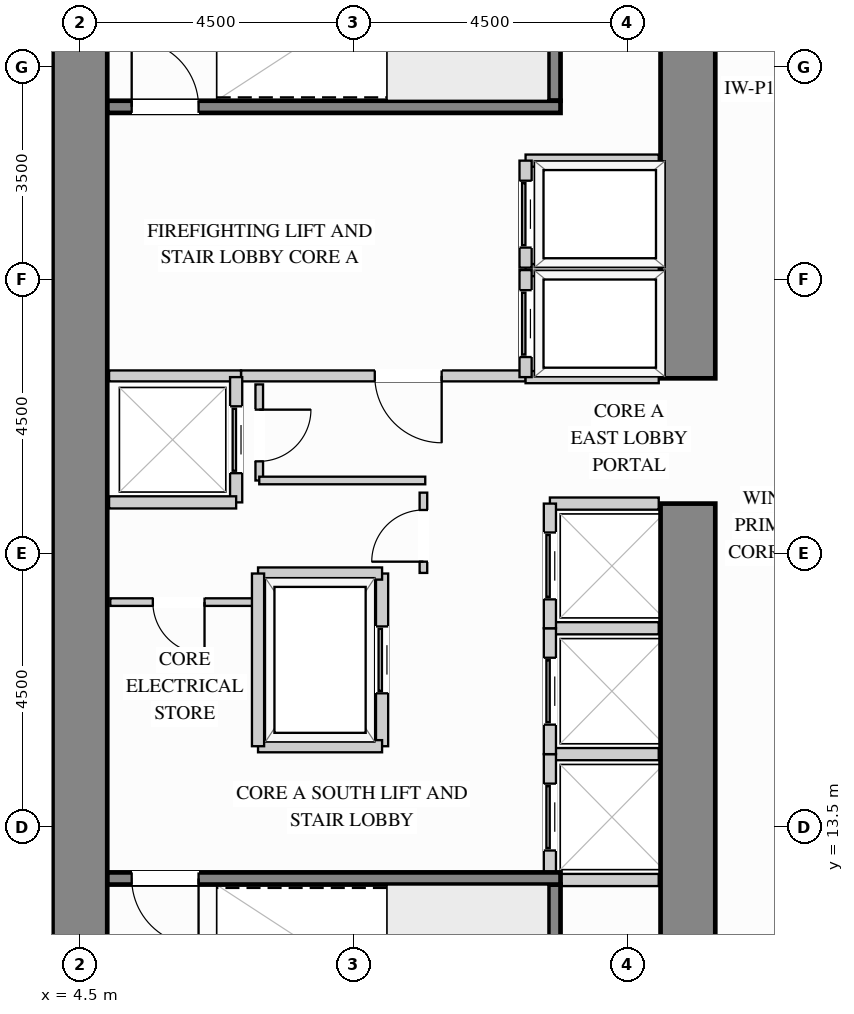
"""IFC4 building model, lengths in metres.
Left out: names, types, materials, properties, quantities, classifications, styles, units other than length and angle.
Written with IfcOpenShell. Run it as: python <this file> out.ifc"""

import sys

from ifc_helpers import new_model, si_unit, direction, frame, frame_2d, origin, place, context, subcontext, project, spatial, rectangle, extrude, source, transform, mapped, element, fill, save


model = new_model("IFC4")
c1 = context("Model", 3, precision=1e-05, world=origin(), true_north=direction((0.0, 1.0)))
c2 = subcontext(c1, "Body", "Model", "MODEL_VIEW")
j1 = project(units=[si_unit("LENGTHUNIT", "METRE"), si_unit("PLANEANGLEUNIT", "RADIAN")], contexts=[c1])
p1 = place(None, origin())
s1 = spatial("IfcSite", under=j1, at=p1, CompositionType="ELEMENT")
p2 = place(p1, origin())
s2 = spatial("IfcBuilding", under=s1, at=p2, CompositionType="ELEMENT")
p3 = place(p2, frame((0.0, 0.0, 33.3)))
s3 = spatial("IfcBuildingStorey", under=s2, at=p3, CompositionType="ELEMENT", Elevation=33.3)
m1 = source(origin(), c2, "Body", "SweptSolid", [
    extrude(rectangle(XDim=9.87, YDim=0.9, at=frame_2d((4.935, 0.0))), origin(), (0.0, 0.0, 1.0), 3.38),
])
p4 = place(p3, frame((14.5, 8.95, 0.0), z_axis=(0.0, 0.0, 1.0), x_axis=(0.0, 1.0, 0.0)))
e1 = element("IfcWall", 1, at=p4, inside=s3, PredefinedType="SHEAR", context=c2, shape_type="MappedRepresentation", body=[
    mapped(m1, transform((0.0, 0.0, 0.0), x_axis=(1.0, 0.0, 0.0), y_axis=(0.0, 1.0, 0.0), z_axis=(0.0, 0.0, 1.0))),
])
m2 = source(origin(), c2, "Body", "SweptSolid", [
    extrude(rectangle(XDim=8.17, YDim=0.9, at=frame_2d((4.085, 0.0))), origin(), (0.0, 0.0, 1.0), 3.38),
])
p5 = place(p3, frame((14.5, 20.88, 0.0), z_axis=(0.0, 0.0, 1.0), x_axis=(0.0, 1.0, 0.0)))
e2 = element("IfcWall", 2, at=p5, inside=s3, PredefinedType="SHEAR", context=c2, shape_type="MappedRepresentation", body=[
    mapped(m2, transform((0.0, 0.0, 0.0), x_axis=(1.0, 0.0, 0.0), y_axis=(0.0, 1.0, 0.0), z_axis=(0.0, 0.0, 1.0))),
])
m3 = source(origin(), c2, "Body", "SweptSolid", [
    extrude(rectangle(XDim=20.1, YDim=0.9, at=frame_2d((10.05, 0.0))), origin(), (0.0, 0.0, 1.0), 3.38),
])
p6 = place(p3, frame((4.5, 8.95, 0.0), z_axis=(0.0, 0.0, 1.0), x_axis=(0.0, 1.0, 0.0)))
e3 = element("IfcWall", 3, at=p6, inside=s3, PredefinedType="SHEAR", context=c2, shape_type="MappedRepresentation", body=[
    mapped(m3, transform((0.0, 0.0, 0.0), x_axis=(1.0, 0.0, 0.0), y_axis=(0.0, 1.0, 0.0), z_axis=(0.0, 0.0, 1.0))),
])
p7 = place(p3, frame((7.15, 20.92, 0.0), z_axis=(0.0, 0.0, 1.0), x_axis=(1.0, 0.0, 0.0)))
e4 = element("IfcWall", 4, at=p7, inside=s3, PredefinedType="PARTITIONING", context=c2, shape_type="SweptSolid", body=[
    extrude(rectangle(XDim=4.68, YDim=0.18, at=frame_2d((2.34, 0.0))), origin(), (0.0, 0.0, 1.0), 3.365),
])
p8 = place(p7, frame((2.2, 0.0, 0.0)))
e5 = element("IfcOpeningElement", 5, at=p8, cuts=e4, PredefinedType="OPENING", context=c2, shape_type="SweptSolid", body=[
    extrude(rectangle(XDim=1.1, YDim=2.15, at=frame_2d((0.55, 1.075))), frame((0.0, 0.1, 0.0), z_axis=(0.0, -1.0, 0.0), x_axis=(1.0, 0.0, 0.0)), (0.0, 0.0, 1.0), 0.2),
])
m4 = source(origin(), c2, "Body", "SweptSolid", [
    extrude(rectangle(XDim=2.17, YDim=0.18, at=frame_2d((1.085, 0.0))), origin(), (0.0, 0.0, 1.0), 3.365),
])
p9 = place(p3, frame((4.98, 20.92, 0.0), z_axis=(0.0, 0.0, 1.0), x_axis=(1.0, 0.0, 0.0)))
e6 = element("IfcWall", 6, at=p9, inside=s3, PredefinedType="PARTITIONING", context=c2, shape_type="MappedRepresentation", body=[
    mapped(m4, transform((0.0, 0.0, 0.0), x_axis=(1.0, 0.0, 0.0), y_axis=(0.0, 1.0, 0.0), z_axis=(0.0, 0.0, 1.0))),
])
p10 = place(p3, frame((10.15, 17.68, 0.0), z_axis=(0.0, 0.0, 1.0), x_axis=(0.0, 1.0, 0.0)))
e7 = element("IfcWall", 7, at=p10, inside=s3, PredefinedType="PARTITIONING", context=c2, shape_type="SweptSolid", body=[
    extrude(rectangle(XDim=1.32, YDim=0.125, at=frame_2d((0.66, 0.0))), origin(), (0.0, 0.0, 1.0), 3.365),
])
p11 = place(p10, frame((0.185, 0.0, 0.0)))
e8 = element("IfcOpeningElement", 8, at=p11, cuts=e7, PredefinedType="OPENING", context=c2, shape_type="SweptSolid", body=[
    extrude(rectangle(XDim=0.85, YDim=2.1, at=frame_2d((0.425, 1.05))), frame((0.0, 0.073, 0.0), z_axis=(0.0, -1.0, 0.0), x_axis=(1.0, 0.0, 0.0)), (0.0, 0.0, 1.0), 0.145),
])
p12 = place(p3, frame((7.45, 19.2, 0.0), z_axis=(0.0, 0.0, 1.0), x_axis=(0.0, 1.0, 0.0)))
e9 = element("IfcWall", 9, at=p12, inside=s3, PredefinedType="PARTITIONING", context=c2, shape_type="SweptSolid", body=[
    extrude(rectangle(XDim=1.58, YDim=0.125, at=frame_2d((0.79, 0.0))), origin(), (0.0, 0.0, 1.0), 3.365),
])
p13 = place(p12, frame((0.315, 0.0, 0.0)))
e10 = element("IfcOpeningElement", 10, at=p13, cuts=e9, PredefinedType="OPENING", context=c2, shape_type="SweptSolid", body=[
    extrude(rectangle(XDim=0.85, YDim=2.1, at=frame_2d((0.425, 1.05))), frame((0.0, 0.073, 0.0), z_axis=(0.0, -1.0, 0.0), x_axis=(1.0, 0.0, 0.0)), (0.0, 0.0, 1.0), 0.145),
])
m5 = source(origin(), c2, "Body", "SweptSolid", [
    extrude(rectangle(XDim=2.73, YDim=0.125, at=frame_2d((1.365, 0.0))), origin(), (0.0, 0.0, 1.0), 3.365),
])
p14 = place(p3, frame((7.45, 19.2, 0.0), z_axis=(0.0, 0.0, 1.0), x_axis=(1.0, 0.0, 0.0)))
e11 = element("IfcWall", 11, at=p14, inside=s3, PredefinedType="PARTITIONING", context=c2, shape_type="MappedRepresentation", body=[
    mapped(m5, transform((0.0, 0.0, 0.0), x_axis=(1.0, 0.0, 0.0), y_axis=(0.0, 1.0, 0.0), z_axis=(0.0, 0.0, 1.0))),
])
p15 = place(p3, frame((5.0, 17.2, 0.0), z_axis=(0.0, 0.0, 1.0), x_axis=(1.0, 0.0, 0.0)))
e12 = element("IfcWall", 12, at=p15, inside=s3, PredefinedType="PARTITIONING", context=c2, shape_type="SweptSolid", body=[
    extrude(rectangle(XDim=2.4, YDim=0.125, at=frame_2d((1.2, 0.0))), origin(), (0.0, 0.0, 1.0), 3.365),
])
p16 = place(p15, frame((0.7, 0.0, 0.0)))
e13 = element("IfcOpeningElement", 13, at=p16, cuts=e12, PredefinedType="OPENING", context=c2, shape_type="SweptSolid", body=[
    extrude(rectangle(XDim=0.85, YDim=2.1, at=frame_2d((0.425, 1.05))), frame((0.0, 0.073, 0.0), z_axis=(0.0, -1.0, 0.0), x_axis=(1.0, 0.0, 0.0)), (0.0, 0.0, 1.0), 0.145),
])
m6 = source(origin(), c2, "Body", "SweptSolid", [
    extrude(rectangle(XDim=2.19, YDim=0.2, at=frame_2d((1.095, 0.0))), origin(), (0.0, 0.0, 1.0), 3.365),
])
for number, where, z_axis, x_axis in (
    (14, (11.83, 22.66, 0.0), (0.0, 0.0, 1.0), (1.0, 0.0, 0.0)),
    (15, (11.83, 20.9, 0.0), (0.0, 0.0, 1.0), (1.0, 0.0, 0.0)),
):
    element("IfcWall", number, at=place(p3, frame(where, z_axis=z_axis, x_axis=x_axis)), inside=s3, PredefinedType="PARTITIONING", context=c2, shape_type="MappedRepresentation", body=[
        mapped(m6, transform((0.0, 0.0, 0.0), x_axis=(1.0, 0.0, 0.0), y_axis=(0.0, 1.0, 0.0), z_axis=(0.0, 0.0, 1.0))),
    ])
p17 = place(p3, frame((11.83, 20.9, 0.0), z_axis=(0.0, 0.0, 1.0), x_axis=(0.0, 1.0, 0.0)))
e16 = element("IfcWall", 16, at=p17, inside=s3, PredefinedType="PARTITIONING", context=c2, shape_type="SweptSolid", body=[
    extrude(rectangle(XDim=1.76, YDim=0.2, at=frame_2d((0.88, 0.0))), origin(), (0.0, 0.0, 1.0), 3.365),
])
p18 = place(p17, frame((0.33, 0.0, 0.0)))
e17 = element("IfcOpeningElement", 17, at=p18, cuts=e16, PredefinedType="OPENING", context=c2, shape_type="SweptSolid", body=[
    extrude(rectangle(XDim=1.1, YDim=2.2, at=frame_2d((0.55, 1.1))), frame((0.0, 0.11, 0.0), z_axis=(0.0, -1.0, 0.0), x_axis=(1.0, 0.0, 0.0)), (0.0, 0.0, 1.0), 0.22),
])
p19 = place(p3, frame((11.83, 24.46, 0.0), z_axis=(0.0, 0.0, 1.0), x_axis=(1.0, 0.0, 0.0)))
e18 = element("IfcWall", 18, at=p19, inside=s3, PredefinedType="PARTITIONING", context=c2, shape_type="MappedRepresentation", body=[
    mapped(m6, transform((0.0, 0.0, 0.0), x_axis=(1.0, 0.0, 0.0), y_axis=(0.0, 1.0, 0.0), z_axis=(0.0, 0.0, 1.0))),
])
p20 = place(p3, frame((11.83, 22.7, 0.0), z_axis=(0.0, 0.0, 1.0), x_axis=(0.0, 1.0, 0.0)))
e19 = element("IfcWall", 19, at=p20, inside=s3, PredefinedType="PARTITIONING", context=c2, shape_type="SweptSolid", body=[
    extrude(rectangle(XDim=1.76, YDim=0.2, at=frame_2d((0.88, 0.0))), origin(), (0.0, 0.0, 1.0), 3.365),
])
p21 = place(p20, frame((0.33, 0.0, 0.0)))
e20 = element("IfcOpeningElement", 20, at=p21, cuts=e19, PredefinedType="OPENING", context=c2, shape_type="SweptSolid", body=[
    extrude(rectangle(XDim=1.1, YDim=2.2, at=frame_2d((0.55, 1.1))), frame((0.0, 0.11, 0.0), z_axis=(0.0, -1.0, 0.0), x_axis=(1.0, 0.0, 0.0)), (0.0, 0.0, 1.0), 0.22),
])
m7 = source(origin(), c2, "Body", "SweptSolid", [
    extrude(rectangle(XDim=1.79, YDim=0.2, at=frame_2d((0.895, 0.0))), origin(), (0.0, 0.0, 1.0), 3.365),
])
for number, where, z_axis, x_axis in (
    (21, (12.23, 14.7, 0.0), (0.0, 0.0, 1.0), (1.0, 0.0, 0.0)),
    (22, (12.23, 12.63, 0.0), (0.0, 0.0, 1.0), (1.0, 0.0, 0.0)),
):
    element("IfcWall", number, at=place(p3, frame(where, z_axis=z_axis, x_axis=x_axis)), inside=s3, PredefinedType="PARTITIONING", context=c2, shape_type="MappedRepresentation", body=[
        mapped(m7, transform((0.0, 0.0, 0.0), x_axis=(1.0, 0.0, 0.0), y_axis=(0.0, 1.0, 0.0), z_axis=(0.0, 0.0, 1.0))),
    ])
p22 = place(p3, frame((12.23, 12.63, 0.0), z_axis=(0.0, 0.0, 1.0), x_axis=(0.0, 1.0, 0.0)))
e23 = element("IfcWall", 23, at=p22, inside=s3, PredefinedType="PARTITIONING", context=c2, shape_type="SweptSolid", body=[
    extrude(rectangle(XDim=2.07, YDim=0.2, at=frame_2d((1.035, 0.0))), origin(), (0.0, 0.0, 1.0), 3.365),
])
p23 = place(p22, frame((0.485, 0.0, 0.0)))
e24 = element("IfcOpeningElement", 24, at=p23, cuts=e23, PredefinedType="OPENING", context=c2, shape_type="SweptSolid", body=[
    extrude(rectangle(XDim=1.1, YDim=2.2, at=frame_2d((0.55, 1.1))), frame((0.0, 0.11, 0.0), z_axis=(0.0, -1.0, 0.0), x_axis=(1.0, 0.0, 0.0)), (0.0, 0.0, 1.0), 0.22),
])
p24 = place(p3, frame((12.23, 16.77, 0.0), z_axis=(0.0, 0.0, 1.0), x_axis=(1.0, 0.0, 0.0)))
e25 = element("IfcWall", 25, at=p24, inside=s3, PredefinedType="PARTITIONING", context=c2, shape_type="MappedRepresentation", body=[
    mapped(m7, transform((0.0, 0.0, 0.0), x_axis=(1.0, 0.0, 0.0), y_axis=(0.0, 1.0, 0.0), z_axis=(0.0, 0.0, 1.0))),
])
p25 = place(p3, frame((12.23, 14.7, 0.0), z_axis=(0.0, 0.0, 1.0), x_axis=(0.0, 1.0, 0.0)))
e26 = element("IfcWall", 26, at=p25, inside=s3, PredefinedType="PARTITIONING", context=c2, shape_type="SweptSolid", body=[
    extrude(rectangle(XDim=2.07, YDim=0.2, at=frame_2d((1.035, 0.0))), origin(), (0.0, 0.0, 1.0), 3.365),
])
p26 = place(p25, frame((0.485, 0.0, 0.0)))
e27 = element("IfcOpeningElement", 27, at=p26, cuts=e26, PredefinedType="OPENING", context=c2, shape_type="SweptSolid", body=[
    extrude(rectangle(XDim=1.1, YDim=2.2, at=frame_2d((0.55, 1.1))), frame((0.0, 0.11, 0.0), z_axis=(0.0, -1.0, 0.0), x_axis=(1.0, 0.0, 0.0)), (0.0, 0.0, 1.0), 0.22),
])
p27 = place(p3, frame((12.23, 18.82, 0.0), z_axis=(0.0, 0.0, 1.0), x_axis=(1.0, 0.0, 0.0)))
e28 = element("IfcWall", 28, at=p27, inside=s3, PredefinedType="PARTITIONING", context=c2, shape_type="MappedRepresentation", body=[
    mapped(m7, transform((0.0, 0.0, 0.0), x_axis=(1.0, 0.0, 0.0), y_axis=(0.0, 1.0, 0.0), z_axis=(0.0, 0.0, 1.0))),
])
p28 = place(p3, frame((12.23, 16.77, 0.0), z_axis=(0.0, 0.0, 1.0), x_axis=(0.0, 1.0, 0.0)))
e29 = element("IfcWall", 29, at=p28, inside=s3, PredefinedType="PARTITIONING", context=c2, shape_type="SweptSolid", body=[
    extrude(rectangle(XDim=2.05, YDim=0.2, at=frame_2d((1.025, 0.0))), origin(), (0.0, 0.0, 1.0), 3.365),
])
p29 = place(p28, frame((0.475, 0.0, 0.0)))
e30 = element("IfcOpeningElement", 30, at=p29, cuts=e29, PredefinedType="OPENING", context=c2, shape_type="SweptSolid", body=[
    extrude(rectangle(XDim=1.1, YDim=2.2, at=frame_2d((0.55, 1.1))), frame((0.0, 0.11, 0.0), z_axis=(0.0, -1.0, 0.0), x_axis=(1.0, 0.0, 0.0)), (0.0, 0.0, 1.0), 0.22),
])
p30 = place(p3, frame((7.07, 18.84, 0.0), z_axis=(0.0, 0.0, 1.0), x_axis=(0.0, 1.0, 0.0)))
e31 = element("IfcWall", 31, at=p30, inside=s3, PredefinedType="PARTITIONING", context=c2, shape_type="SweptSolid", body=[
    extrude(rectangle(XDim=2.06, YDim=0.2, at=frame_2d((1.03, 0.0))), origin(), (0.0, 0.0, 1.0), 3.365),
])
p31 = place(p30, frame((0.48, 0.0, 0.0)))
e32 = element("IfcOpeningElement", 32, at=p31, cuts=e31, PredefinedType="OPENING", context=c2, shape_type="SweptSolid", body=[
    extrude(rectangle(XDim=1.1, YDim=2.2, at=frame_2d((0.55, 1.1))), frame((0.0, 0.11, 0.0), z_axis=(0.0, -1.0, 0.0), x_axis=(1.0, 0.0, 0.0)), (0.0, 0.0, 1.0), 0.22),
])
m8 = source(origin(), c2, "Body", "SweptSolid", [
    extrude(rectangle(XDim=2.09, YDim=0.2, at=frame_2d((1.045, 0.0))), origin(), (0.0, 0.0, 1.0), 3.365),
])
p32 = place(p3, frame((4.98, 18.84, 0.0), z_axis=(0.0, 0.0, 1.0), x_axis=(1.0, 0.0, 0.0)))
e33 = element("IfcWall", 33, at=p32, inside=s3, PredefinedType="PARTITIONING", context=c2, shape_type="MappedRepresentation", body=[
    mapped(m8, transform((0.0, 0.0, 0.0), x_axis=(1.0, 0.0, 0.0), y_axis=(0.0, 1.0, 0.0), z_axis=(0.0, 0.0, 1.0))),
])
p33 = place(p3, frame((9.47, 14.83, 0.0), z_axis=(0.0, 0.0, 1.0), x_axis=(0.0, 1.0, 0.0)))
e34 = element("IfcWall", 34, at=p33, inside=s3, PredefinedType="PARTITIONING", context=c2, shape_type="SweptSolid", body=[
    extrude(rectangle(XDim=2.84, YDim=0.2, at=frame_2d((1.42, 0.0))), origin(), (0.0, 0.0, 1.0), 3.365),
])
p34 = place(p33, frame((0.87, 0.0, 0.0)))
e35 = element("IfcOpeningElement", 35, at=p34, cuts=e34, PredefinedType="OPENING", context=c2, shape_type="SweptSolid", body=[
    extrude(rectangle(XDim=1.1, YDim=2.2, at=frame_2d((0.55, 1.1))), frame((0.0, 0.11, 0.0), z_axis=(0.0, -1.0, 0.0), x_axis=(1.0, 0.0, 0.0)), (0.0, 0.0, 1.0), 0.22),
])
m9 = source(origin(), c2, "Body", "SweptSolid", [
    extrude(rectangle(XDim=2.04, YDim=0.2, at=frame_2d((1.02, 0.0))), origin(), (0.0, 0.0, 1.0), 3.365),
])
for number, where, z_axis, x_axis in (
    (36, (7.43, 17.67, 0.0), (0.0, 0.0, 1.0), (1.0, 0.0, 0.0)),
    (37, (7.43, 14.83, 0.0), (0.0, 0.0, 1.0), (1.0, 0.0, 0.0)),
):
    element("IfcWall", number, at=place(p3, frame(where, z_axis=z_axis, x_axis=x_axis)), inside=s3, PredefinedType="PARTITIONING", context=c2, shape_type="MappedRepresentation", body=[
        mapped(m9, transform((0.0, 0.0, 0.0), x_axis=(1.0, 0.0, 0.0), y_axis=(0.0, 1.0, 0.0), z_axis=(0.0, 0.0, 1.0))),
    ])
m10 = source(origin(), c2, "Body", "SweptSolid", [
    extrude(rectangle(XDim=2.84, YDim=0.2, at=frame_2d((1.42, 0.0))), origin(), (0.0, 0.0, 1.0), 3.365),
])
p35 = place(p3, frame((7.43, 14.83, 0.0), z_axis=(0.0, 0.0, 1.0), x_axis=(0.0, 1.0, 0.0)))
e38 = element("IfcWall", 38, at=p35, inside=s3, PredefinedType="PARTITIONING", context=c2, shape_type="MappedRepresentation", body=[
    mapped(m10, transform((0.0, 0.0, 0.0), x_axis=(1.0, 0.0, 0.0), y_axis=(0.0, 1.0, 0.0), z_axis=(0.0, 0.0, 1.0))),
])
m11 = source(origin(), c2, "Body", "SweptSolid", [
    extrude(rectangle(XDim=3.603, YDim=0.2, at=frame_2d((1.802, 0.0))), origin(), (0.0, 0.0, 1.0), 3.38),
])
p36 = place(p3, frame((12.305, 8.952, 0.0), z_axis=(0.0, 0.0, 1.0), x_axis=(0.0, 1.0, 0.0)))
e39 = element("IfcWall", 39, at=p36, inside=s3, PredefinedType="SHEAR", context=c2, shape_type="MappedRepresentation", body=[
    mapped(m11, transform((0.0, 0.0, 0.0), x_axis=(1.0, 0.0, 0.0), y_axis=(0.0, 1.0, 0.0), z_axis=(0.0, 0.0, 1.0))),
])
p37 = place(p3, frame((4.952, 12.655, 0.0), z_axis=(0.0, 0.0, 1.0), x_axis=(1.0, 0.0, 0.0)))
e40 = element("IfcWall", 40, at=p37, inside=s3, PredefinedType="SHEAR", context=c2, shape_type="SweptSolid", body=[
    extrude(rectangle(XDim=7.453, YDim=0.2, at=frame_2d((3.727, 0.0))), origin(), (0.0, 0.0, 1.0), 3.38),
])
p38 = place(p37, frame((0.4, 0.0, 0.0)))
e41 = element("IfcOpeningElement", 41, at=p38, cuts=e40, PredefinedType="OPENING", context=c2, shape_type="SweptSolid", body=[
    extrude(rectangle(XDim=1.1, YDim=2.15, at=frame_2d((0.55, 1.075))), frame((0.0, 0.11, 0.0), z_axis=(0.0, -1.0, 0.0), x_axis=(1.0, 0.0, 0.0)), (0.0, 0.0, 1.0), 0.22),
])
p39 = place(p3, frame((12.305, 25.445, 0.0), z_axis=(0.0, 0.0, 1.0), x_axis=(0.0, 1.0, 0.0)))
e42 = element("IfcWall", 42, at=p39, inside=s3, PredefinedType="SHEAR", context=c2, shape_type="MappedRepresentation", body=[
    mapped(m11, transform((0.0, 0.0, 0.0), x_axis=(1.0, 0.0, 0.0), y_axis=(0.0, 1.0, 0.0), z_axis=(0.0, 0.0, 1.0))),
])
p40 = place(p3, frame((4.952, 25.345, 0.0), z_axis=(0.0, 0.0, 1.0), x_axis=(1.0, 0.0, 0.0)))
e43 = element("IfcWall", 43, at=p40, inside=s3, PredefinedType="SHEAR", context=c2, shape_type="SweptSolid", body=[
    extrude(rectangle(XDim=7.453, YDim=0.2, at=frame_2d((3.727, 0.0))), origin(), (0.0, 0.0, 1.0), 3.38),
])
p41 = place(p40, frame((0.4, 0.0, 0.0)))
e44 = element("IfcOpeningElement", 44, at=p41, cuts=e43, PredefinedType="OPENING", context=c2, shape_type="SweptSolid", body=[
    extrude(rectangle(XDim=1.1, YDim=2.15, at=frame_2d((0.55, 1.075))), frame((0.0, 0.11, 0.0), z_axis=(0.0, -1.0, 0.0), x_axis=(1.0, 0.0, 0.0)), (0.0, 0.0, 1.0), 0.22),
])
m12 = source(origin(), c2, "Body", "SweptSolid", [
    extrude(rectangle(XDim=1.1, YDim=2.15, at=frame_2d((0.55, 1.075))), frame((0.0, 0.025, 0.0), z_axis=(0.0, -1.0, 0.0), x_axis=(1.0, 0.0, 0.0)), (0.0, 0.0, 1.0), 0.05),
])
p42 = place(p8, origin())
e45 = element("IfcDoor", 45, at=p42, inside=s3, OperationType="SINGLE_SWING_RIGHT", PredefinedType="DOOR", context=c2, shape_type="MappedRepresentation", body=[
    mapped(m12, transform((0.0, 0.0, 0.0), x_axis=(1.0, 0.0, 0.0), y_axis=(0.0, 1.0, 0.0), z_axis=(0.0, 0.0, 1.0))),
])
fill(e5, e45)
m13 = source(origin(), c2, "Body", "SweptSolid", [
    extrude(rectangle(XDim=1.1, YDim=2.2, at=frame_2d((0.55, 1.1))), frame((0.0, 0.025, 0.0), z_axis=(0.0, -1.0, 0.0), x_axis=(1.0, 0.0, 0.0)), (0.0, 0.0, 1.0), 0.05),
])
p43 = place(p18, origin())
e46 = element("IfcDoor", 46, at=p43, inside=s3, OperationType="SLIDING_TO_LEFT", PredefinedType="DOOR", context=c2, shape_type="MappedRepresentation", body=[
    mapped(m13, transform((0.0, 0.0, 0.0), x_axis=(1.0, 0.0, 0.0), y_axis=(0.0, 1.0, 0.0), z_axis=(0.0, 0.0, 1.0))),
])
fill(e17, e46)
p44 = place(p21, origin())
e47 = element("IfcDoor", 47, at=p44, inside=s3, OperationType="SLIDING_TO_LEFT", PredefinedType="DOOR", context=c2, shape_type="MappedRepresentation", body=[
    mapped(m13, transform((0.0, 0.0, 0.0), x_axis=(1.0, 0.0, 0.0), y_axis=(0.0, 1.0, 0.0), z_axis=(0.0, 0.0, 1.0))),
])
fill(e20, e47)
p45 = place(p23, origin())
e48 = element("IfcDoor", 48, at=p45, inside=s3, OperationType="SLIDING_TO_LEFT", PredefinedType="DOOR", context=c2, shape_type="MappedRepresentation", body=[
    mapped(m13, transform((0.0, 0.0, 0.0), x_axis=(1.0, 0.0, 0.0), y_axis=(0.0, 1.0, 0.0), z_axis=(0.0, 0.0, 1.0))),
])
fill(e24, e48)
p46 = place(p26, origin())
e49 = element("IfcDoor", 49, at=p46, inside=s3, OperationType="SLIDING_TO_LEFT", PredefinedType="DOOR", context=c2, shape_type="MappedRepresentation", body=[
    mapped(m13, transform((0.0, 0.0, 0.0), x_axis=(1.0, 0.0, 0.0), y_axis=(0.0, 1.0, 0.0), z_axis=(0.0, 0.0, 1.0))),
])
fill(e27, e49)
p47 = place(p29, origin())
e50 = element("IfcDoor", 50, at=p47, inside=s3, OperationType="SLIDING_TO_LEFT", PredefinedType="DOOR", context=c2, shape_type="MappedRepresentation", body=[
    mapped(m13, transform((0.0, 0.0, 0.0), x_axis=(1.0, 0.0, 0.0), y_axis=(0.0, 1.0, 0.0), z_axis=(0.0, 0.0, 1.0))),
])
fill(e30, e50)
p48 = place(p31, origin())
e51 = element("IfcDoor", 51, at=p48, inside=s3, OperationType="SLIDING_TO_LEFT", PredefinedType="DOOR", context=c2, shape_type="MappedRepresentation", body=[
    mapped(m13, transform((0.0, 0.0, 0.0), x_axis=(1.0, 0.0, 0.0), y_axis=(0.0, 1.0, 0.0), z_axis=(0.0, 0.0, 1.0))),
])
fill(e32, e51)
p49 = place(p34, origin())
e52 = element("IfcDoor", 52, at=p49, inside=s3, OperationType="SLIDING_TO_LEFT", PredefinedType="DOOR", context=c2, shape_type="MappedRepresentation", body=[
    mapped(m13, transform((0.0, 0.0, 0.0), x_axis=(1.0, 0.0, 0.0), y_axis=(0.0, 1.0, 0.0), z_axis=(0.0, 0.0, 1.0))),
])
fill(e35, e52)
m14 = source(origin(), c2, "Body", "SweptSolid", [
    extrude(rectangle(XDim=0.85, YDim=2.1, at=frame_2d((0.425, 1.05))), frame((0.0, 0.025, 0.0), z_axis=(0.0, -1.0, 0.0), x_axis=(1.0, 0.0, 0.0)), (0.0, 0.0, 1.0), 0.05),
])
p50 = place(p11, origin())
e53 = element("IfcDoor", 53, at=p50, inside=s3, OperationType="SINGLE_SWING_LEFT", PredefinedType="DOOR", context=c2, shape_type="MappedRepresentation", body=[
    mapped(m14, transform((0.0, 0.0, 0.0), x_axis=(1.0, 0.0, 0.0), y_axis=(0.0, 1.0, 0.0), z_axis=(0.0, 0.0, 1.0))),
])
fill(e8, e53)
p51 = place(p16, origin())
e54 = element("IfcDoor", 54, at=p51, inside=s3, OperationType="SINGLE_SWING_RIGHT", PredefinedType="DOOR", context=c2, shape_type="MappedRepresentation", body=[
    mapped(m14, transform((0.0, 0.0, 0.0), x_axis=(1.0, 0.0, 0.0), y_axis=(0.0, 1.0, 0.0), z_axis=(0.0, 0.0, 1.0))),
])
fill(e13, e54)
p52 = place(p13, origin())
e55 = element("IfcDoor", 55, at=p52, inside=s3, OperationType="SINGLE_SWING_RIGHT", PredefinedType="DOOR", context=c2, shape_type="MappedRepresentation", body=[
    mapped(m14, transform((0.0, 0.0, 0.0), x_axis=(1.0, 0.0, 0.0), y_axis=(0.0, 1.0, 0.0), z_axis=(0.0, 0.0, 1.0))),
])
fill(e10, e55)
m15 = source(origin(), c2, "Body", "SweptSolid", [
    extrude(rectangle(XDim=1.1, YDim=2.15, at=frame_2d((0.55, 1.075))), frame((0.0, 0.025, 0.0), z_axis=(0.0, -1.0, 0.0), x_axis=(1.0, 0.0, 0.0)), (0.0, 0.0, 1.0), 0.05),
])
p53 = place(p38, origin())
e56 = element("IfcDoor", 56, at=p53, inside=s3, OperationType="SINGLE_SWING_RIGHT", PredefinedType="DOOR", context=c2, shape_type="MappedRepresentation", body=[
    mapped(m15, transform((0.0, 0.0, 0.0), x_axis=(1.0, 0.0, 0.0), y_axis=(0.0, 1.0, 0.0), z_axis=(0.0, 0.0, 1.0))),
])
fill(e41, e56)
p54 = place(p41, origin())
e57 = element("IfcDoor", 57, at=p54, inside=s3, OperationType="SINGLE_SWING_LEFT", PredefinedType="DOOR", context=c2, shape_type="MappedRepresentation", body=[
    mapped(m15, transform((0.0, 0.0, 0.0), x_axis=(1.0, 0.0, 0.0), y_axis=(0.0, 1.0, 0.0), z_axis=(0.0, 0.0, 1.0))),
])
fill(e44, e57)
save(model, sys.argv[1])
